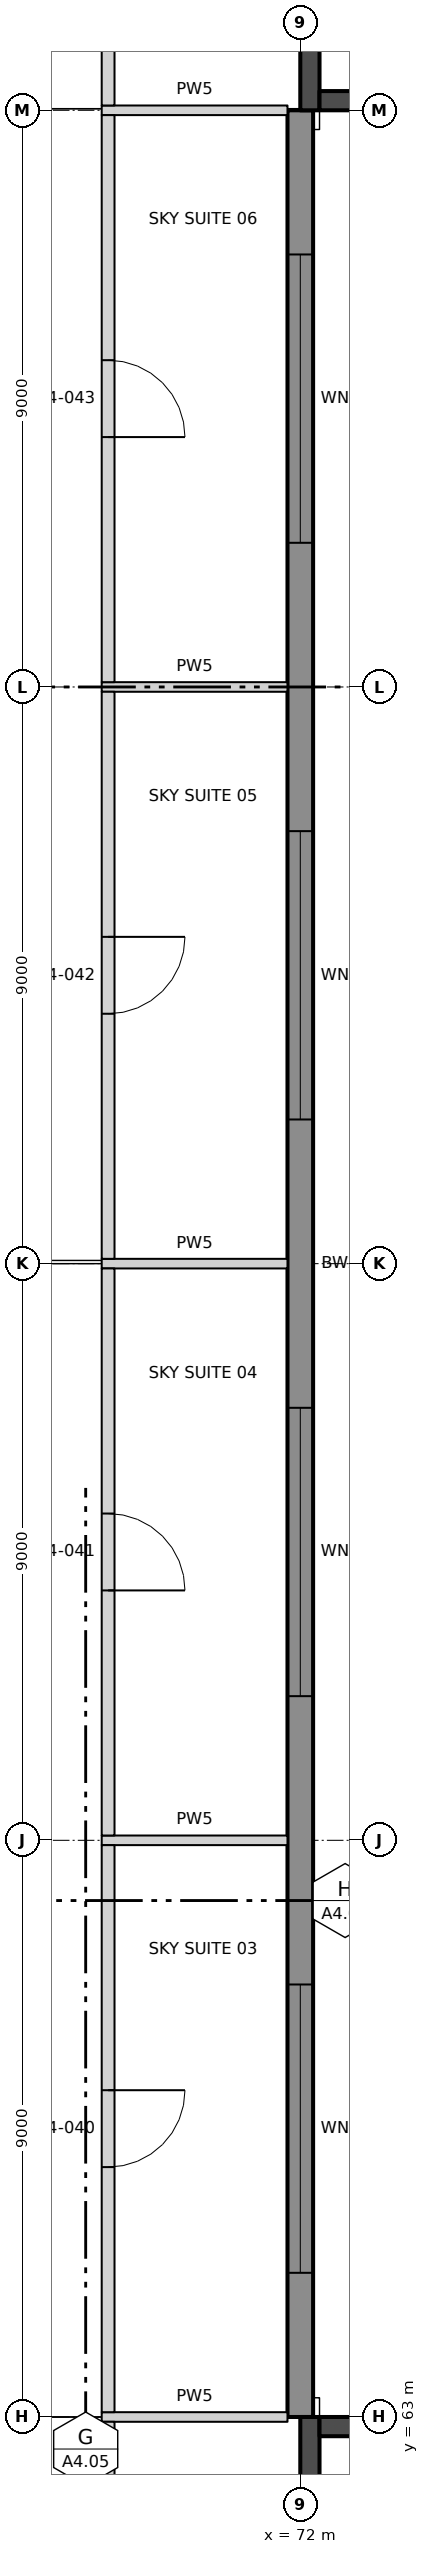
"""IFC4 building model, lengths in metres.
Left out: names, types, materials, properties, quantities, classifications, styles, units other than length and angle.
Written with IfcOpenShell. Run it as: python <this file> out.ifc"""

import sys

from ifc_helpers import new_model, si_unit, direction, frame, frame_2d, origin, place, context, subcontext, project, spatial, rectangle, extrude, element, fill, save


model = new_model("IFC4")
c1 = context("Model", 3, precision=1e-05, world=origin(), true_north=direction((0.0, 1.0)))
c2 = subcontext(c1, "Body", "Model", "MODEL_VIEW")
j1 = project(units=[si_unit("LENGTHUNIT", "METRE"), si_unit("PLANEANGLEUNIT", "RADIAN")], contexts=[c1])
p1 = place(None, origin())
s1 = spatial("IfcSite", under=j1, at=p1, CompositionType="ELEMENT")
p2 = place(p1, origin())
s2 = spatial("IfcBuilding", under=s1, at=p2, CompositionType="ELEMENT")
p3 = place(p2, frame((0.0, 0.0, 28.0)))
s3 = spatial("IfcBuildingStorey", under=s2, at=p3, CompositionType="ELEMENT", Elevation=28.0)
p4 = place(p3, frame((72.0, 99.0, 0.0), z_axis=(0.0, 0.0, 1.0), x_axis=(0.0, -1.0, 0.0)))
e1 = element("IfcWall", 1, at=p4, inside=s3, PredefinedType="SOLIDWALL", context=c2, shape_type="SweptSolid", body=[
    extrude(rectangle(XDim=36.0, YDim=0.4, at=frame_2d((18.0, 0.0))), origin(), (0.0, 0.0, 1.0), 5.5),
])
p5 = place(p4, frame((29.25, 0.0, 0.9)))
e2 = element("IfcOpeningElement", 2, at=p5, cuts=e1, PredefinedType="OPENING", context=c2, shape_type="SweptSolid", body=[
    extrude(rectangle(XDim=4.5, YDim=1.8, at=frame_2d((2.25, 0.9))), frame((0.0, 0.21, 0.0), z_axis=(0.0, -1.0, 0.0), x_axis=(1.0, 0.0, 0.0)), (0.0, 0.0, 1.0), 0.42),
])
p6 = place(p4, frame((20.25, 0.0, 0.9)))
e3 = element("IfcOpeningElement", 3, at=p6, cuts=e1, PredefinedType="OPENING", context=c2, shape_type="SweptSolid", body=[
    extrude(rectangle(XDim=4.5, YDim=1.8, at=frame_2d((2.25, 0.9))), frame((0.0, 0.21, 0.0), z_axis=(0.0, -1.0, 0.0), x_axis=(1.0, 0.0, 0.0)), (0.0, 0.0, 1.0), 0.42),
])
p7 = place(p4, frame((11.25, 0.0, 0.9)))
e4 = element("IfcOpeningElement", 4, at=p7, cuts=e1, PredefinedType="OPENING", context=c2, shape_type="SweptSolid", body=[
    extrude(rectangle(XDim=4.5, YDim=1.8, at=frame_2d((2.25, 0.9))), frame((0.0, 0.21, 0.0), z_axis=(0.0, -1.0, 0.0), x_axis=(1.0, 0.0, 0.0)), (0.0, 0.0, 1.0), 0.42),
])
p8 = place(p4, frame((2.25, 0.0, 0.9)))
e5 = element("IfcOpeningElement", 5, at=p8, cuts=e1, PredefinedType="OPENING", context=c2, shape_type="SweptSolid", body=[
    extrude(rectangle(XDim=4.5, YDim=1.8, at=frame_2d((2.25, 0.9))), frame((0.0, 0.21, 0.0), z_axis=(0.0, -1.0, 0.0), x_axis=(1.0, 0.0, 0.0)), (0.0, 0.0, 1.0), 0.42),
])
for number, where, z_axis, x_axis in (
    (6, (68.9, 63.0, 0.0), (0.0, 0.0, 1.0), (1.0, 0.0, 0.0)),
    (7, (68.9, 72.0, 0.0), (0.0, 0.0, 1.0), (1.0, 0.0, 0.0)),
    (8, (68.9, 81.0, 0.0), (0.0, 0.0, 1.0), (1.0, 0.0, 0.0)),
    (9, (68.9, 90.0, 0.0), (0.0, 0.0, 1.0), (1.0, 0.0, 0.0)),
    (10, (68.9, 99.0, 0.0), (0.0, 0.0, 1.0), (1.0, 0.0, 0.0)),
):
    element("IfcWall", number, at=place(p3, frame(where, z_axis=z_axis, x_axis=x_axis)), inside=s3, PredefinedType="PARTITIONING", context=c2, shape_type="SweptSolid", body=[
        extrude(rectangle(XDim=2.9, YDim=0.15, at=frame_2d((1.45, 0.0))), origin(), (0.0, 0.0, 1.0), 4.2),
    ])
p9 = place(p3, frame((69.0, 54.075, 0.0), z_axis=(0.0, 0.0, 1.0), x_axis=(0.0, 1.0, 0.0)))
e11 = element("IfcWall", 11, at=p9, inside=s3, PredefinedType="PARTITIONING", context=c2, shape_type="SweptSolid", body=[
    extrude(rectangle(XDim=8.85, YDim=0.2, at=frame_2d((4.425, 0.0))), origin(), (0.0, 0.0, 1.0), 5.5),
])
p10 = place(p9, frame((3.825, 0.0, 0.0)))
e12 = element("IfcOpeningElement", 12, at=p10, cuts=e11, PredefinedType="OPENING", context=c2, shape_type="SweptSolid", body=[
    extrude(rectangle(XDim=1.2, YDim=2.1, at=frame_2d((0.6, 1.05))), frame((0.0, 0.11, 0.0), z_axis=(0.0, -1.0, 0.0), x_axis=(1.0, 0.0, 0.0)), (0.0, 0.0, 1.0), 0.22),
])
p11 = place(p3, frame((69.0, 63.075, 0.0), z_axis=(0.0, 0.0, 1.0), x_axis=(0.0, 1.0, 0.0)))
e13 = element("IfcWall", 13, at=p11, inside=s3, PredefinedType="PARTITIONING", context=c2, shape_type="SweptSolid", body=[
    extrude(rectangle(XDim=8.85, YDim=0.2, at=frame_2d((4.425, 0.0))), origin(), (0.0, 0.0, 1.0), 5.5),
])
p12 = place(p11, frame((3.825, 0.0, 0.0)))
e14 = element("IfcOpeningElement", 14, at=p12, cuts=e13, PredefinedType="OPENING", context=c2, shape_type="SweptSolid", body=[
    extrude(rectangle(XDim=1.2, YDim=2.1, at=frame_2d((0.6, 1.05))), frame((0.0, 0.11, 0.0), z_axis=(0.0, -1.0, 0.0), x_axis=(1.0, 0.0, 0.0)), (0.0, 0.0, 1.0), 0.22),
])
p13 = place(p3, frame((69.0, 72.075, 0.0), z_axis=(0.0, 0.0, 1.0), x_axis=(0.0, 1.0, 0.0)))
e15 = element("IfcWall", 15, at=p13, inside=s3, PredefinedType="PARTITIONING", context=c2, shape_type="SweptSolid", body=[
    extrude(rectangle(XDim=8.85, YDim=0.2, at=frame_2d((4.425, 0.0))), origin(), (0.0, 0.0, 1.0), 5.5),
])
p14 = place(p13, frame((3.825, 0.0, 0.0)))
e16 = element("IfcOpeningElement", 16, at=p14, cuts=e15, PredefinedType="OPENING", context=c2, shape_type="SweptSolid", body=[
    extrude(rectangle(XDim=1.2, YDim=2.1, at=frame_2d((0.6, 1.05))), frame((0.0, 0.11, 0.0), z_axis=(0.0, -1.0, 0.0), x_axis=(1.0, 0.0, 0.0)), (0.0, 0.0, 1.0), 0.22),
])
p15 = place(p3, frame((69.0, 81.075, 0.0), z_axis=(0.0, 0.0, 1.0), x_axis=(0.0, 1.0, 0.0)))
e17 = element("IfcWall", 17, at=p15, inside=s3, PredefinedType="PARTITIONING", context=c2, shape_type="SweptSolid", body=[
    extrude(rectangle(XDim=8.85, YDim=0.2, at=frame_2d((4.425, 0.0))), origin(), (0.0, 0.0, 1.0), 5.5),
])
p16 = place(p15, frame((3.825, 0.0, 0.0)))
e18 = element("IfcOpeningElement", 18, at=p16, cuts=e17, PredefinedType="OPENING", context=c2, shape_type="SweptSolid", body=[
    extrude(rectangle(XDim=1.2, YDim=2.1, at=frame_2d((0.6, 1.05))), frame((0.0, 0.11, 0.0), z_axis=(0.0, -1.0, 0.0), x_axis=(1.0, 0.0, 0.0)), (0.0, 0.0, 1.0), 0.22),
])
p17 = place(p3, frame((69.0, 90.075, 0.0), z_axis=(0.0, 0.0, 1.0), x_axis=(0.0, 1.0, 0.0)))
e19 = element("IfcWall", 19, at=p17, inside=s3, PredefinedType="PARTITIONING", context=c2, shape_type="SweptSolid", body=[
    extrude(rectangle(XDim=8.85, YDim=0.2, at=frame_2d((4.425, 0.0))), origin(), (0.0, 0.0, 1.0), 5.5),
])
p18 = place(p17, frame((3.825, 0.0, 0.0)))
e20 = element("IfcOpeningElement", 20, at=p18, cuts=e19, PredefinedType="OPENING", context=c2, shape_type="SweptSolid", body=[
    extrude(rectangle(XDim=1.2, YDim=2.1, at=frame_2d((0.6, 1.05))), frame((0.0, 0.11, 0.0), z_axis=(0.0, -1.0, 0.0), x_axis=(1.0, 0.0, 0.0)), (0.0, 0.0, 1.0), 0.22),
])
p19 = place(p3, frame((69.0, 99.075, 0.0), z_axis=(0.0, 0.0, 1.0), x_axis=(0.0, 1.0, 0.0)))
e21 = element("IfcWall", 21, at=p19, inside=s3, PredefinedType="PARTITIONING", context=c2, shape_type="SweptSolid", body=[
    extrude(rectangle(XDim=8.85, YDim=0.2, at=frame_2d((4.425, 0.0))), origin(), (0.0, 0.0, 1.0), 5.5),
])
p20 = place(p19, frame((3.825, 0.0, 0.0)))
e22 = element("IfcOpeningElement", 22, at=p20, cuts=e21, PredefinedType="OPENING", context=c2, shape_type="SweptSolid", body=[
    extrude(rectangle(XDim=1.2, YDim=2.1, at=frame_2d((0.6, 1.05))), frame((0.0, 0.11, 0.0), z_axis=(0.0, -1.0, 0.0), x_axis=(1.0, 0.0, 0.0)), (0.0, 0.0, 1.0), 0.22),
])
p21 = place(p3, frame((72.15, 63.0, 0.0), z_axis=(0.0, 0.0, 1.0), x_axis=(0.0, -1.0, 0.0)))
e23 = element("IfcWall", 23, at=p21, inside=s3, PredefinedType="SHEAR", context=c2, shape_type="SweptSolid", body=[
    extrude(rectangle(XDim=18.0, YDim=0.3, at=frame_2d((9.0, 0.0))), origin(), (0.0, 0.0, 1.0), 5.5),
])
p22 = place(p3, frame((80.7, 62.85, 0.0), z_axis=(0.0, 0.0, 1.0), x_axis=(-1.0, 0.0, 0.0)))
e24 = element("IfcWall", 24, at=p22, inside=s3, PredefinedType="SHEAR", context=c2, shape_type="SweptSolid", body=[
    extrude(rectangle(XDim=8.4, YDim=0.3, at=frame_2d((4.2, 0.0))), origin(), (0.0, 0.0, 1.0), 5.5),
])
p23 = place(p3, frame((72.15, 99.0, 0.0), z_axis=(0.0, 0.0, 1.0), x_axis=(0.0, 1.0, 0.0)))
e25 = element("IfcWall", 25, at=p23, inside=s3, PredefinedType="SHEAR", context=c2, shape_type="SweptSolid", body=[
    extrude(rectangle(XDim=18.0, YDim=0.3, at=frame_2d((9.0, 0.0))), origin(), (0.0, 0.0, 1.0), 5.5),
])
p24 = place(p3, frame((80.7, 99.15, 0.0), z_axis=(0.0, 0.0, 1.0), x_axis=(-1.0, 0.0, 0.0)))
e26 = element("IfcWall", 26, at=p24, inside=s3, PredefinedType="SHEAR", context=c2, shape_type="SweptSolid", body=[
    extrude(rectangle(XDim=8.4, YDim=0.3, at=frame_2d((4.2, 0.0))), origin(), (0.0, 0.0, 1.0), 5.5),
])
p25 = place(p12, frame((1.2, 0.0, 0.0), z_axis=(0.0, 0.0, 1.0), x_axis=(-1.0, 0.0, 0.0)))
e27 = element("IfcDoor", 27, at=p25, inside=s3, OperationType="SINGLE_SWING_LEFT", PredefinedType="DOOR", context=c2, shape_type="SweptSolid", body=[
    extrude(rectangle(XDim=1.2, YDim=2.1, at=frame_2d((0.6, 1.05))), frame((0.0, 0.025, 0.0), z_axis=(0.0, -1.0, 0.0), x_axis=(1.0, 0.0, 0.0)), (0.0, 0.0, 1.0), 0.05),
])
fill(e14, e27)
p26 = place(p14, frame((1.2, 0.0, 0.0), z_axis=(0.0, 0.0, 1.0), x_axis=(-1.0, 0.0, 0.0)))
e28 = element("IfcDoor", 28, at=p26, inside=s3, OperationType="SINGLE_SWING_RIGHT", PredefinedType="DOOR", context=c2, shape_type="SweptSolid", body=[
    extrude(rectangle(XDim=1.2, YDim=2.1, at=frame_2d((0.6, 1.05))), frame((0.0, 0.025, 0.0), z_axis=(0.0, -1.0, 0.0), x_axis=(1.0, 0.0, 0.0)), (0.0, 0.0, 1.0), 0.05),
])
fill(e16, e28)
p27 = place(p16, frame((1.2, 0.0, 0.0), z_axis=(0.0, 0.0, 1.0), x_axis=(-1.0, 0.0, 0.0)))
e29 = element("IfcDoor", 29, at=p27, inside=s3, OperationType="SINGLE_SWING_LEFT", PredefinedType="DOOR", context=c2, shape_type="SweptSolid", body=[
    extrude(rectangle(XDim=1.2, YDim=2.1, at=frame_2d((0.6, 1.05))), frame((0.0, 0.025, 0.0), z_axis=(0.0, -1.0, 0.0), x_axis=(1.0, 0.0, 0.0)), (0.0, 0.0, 1.0), 0.05),
])
fill(e18, e29)
p28 = place(p18, frame((1.2, 0.0, 0.0), z_axis=(0.0, 0.0, 1.0), x_axis=(-1.0, 0.0, 0.0)))
e30 = element("IfcDoor", 30, at=p28, inside=s3, OperationType="SINGLE_SWING_RIGHT", PredefinedType="DOOR", context=c2, shape_type="SweptSolid", body=[
    extrude(rectangle(XDim=1.2, YDim=2.1, at=frame_2d((0.6, 1.05))), frame((0.0, 0.025, 0.0), z_axis=(0.0, -1.0, 0.0), x_axis=(1.0, 0.0, 0.0)), (0.0, 0.0, 1.0), 0.05),
])
fill(e20, e30)
p29 = place(p5, origin())
e31 = element("IfcWindow", 31, at=p29, inside=s3, PartitioningType="SINGLE_PANEL", PredefinedType="WINDOW", context=c2, shape_type="SweptSolid", body=[
    extrude(rectangle(XDim=4.5, YDim=1.8, at=frame_2d((2.25, 0.9))), frame((0.0, 0.03, 0.0), z_axis=(0.0, -1.0, 0.0), x_axis=(1.0, 0.0, 0.0)), (0.0, 0.0, 1.0), 0.06),
])
fill(e2, e31)
p30 = place(p6, origin())
e32 = element("IfcWindow", 32, at=p30, inside=s3, PartitioningType="SINGLE_PANEL", PredefinedType="WINDOW", context=c2, shape_type="SweptSolid", body=[
    extrude(rectangle(XDim=4.5, YDim=1.8, at=frame_2d((2.25, 0.9))), frame((0.0, 0.03, 0.0), z_axis=(0.0, -1.0, 0.0), x_axis=(1.0, 0.0, 0.0)), (0.0, 0.0, 1.0), 0.06),
])
fill(e3, e32)
p31 = place(p7, origin())
e33 = element("IfcWindow", 33, at=p31, inside=s3, PartitioningType="SINGLE_PANEL", PredefinedType="WINDOW", context=c2, shape_type="SweptSolid", body=[
    extrude(rectangle(XDim=4.5, YDim=1.8, at=frame_2d((2.25, 0.9))), frame((0.0, 0.03, 0.0), z_axis=(0.0, -1.0, 0.0), x_axis=(1.0, 0.0, 0.0)), (0.0, 0.0, 1.0), 0.06),
])
fill(e4, e33)
p32 = place(p8, origin())
e34 = element("IfcWindow", 34, at=p32, inside=s3, PartitioningType="SINGLE_PANEL", PredefinedType="WINDOW", context=c2, shape_type="SweptSolid", body=[
    extrude(rectangle(XDim=4.5, YDim=1.8, at=frame_2d((2.25, 0.9))), frame((0.0, 0.03, 0.0), z_axis=(0.0, -1.0, 0.0), x_axis=(1.0, 0.0, 0.0)), (0.0, 0.0, 1.0), 0.06),
])
fill(e5, e34)
save(model, sys.argv[1])
